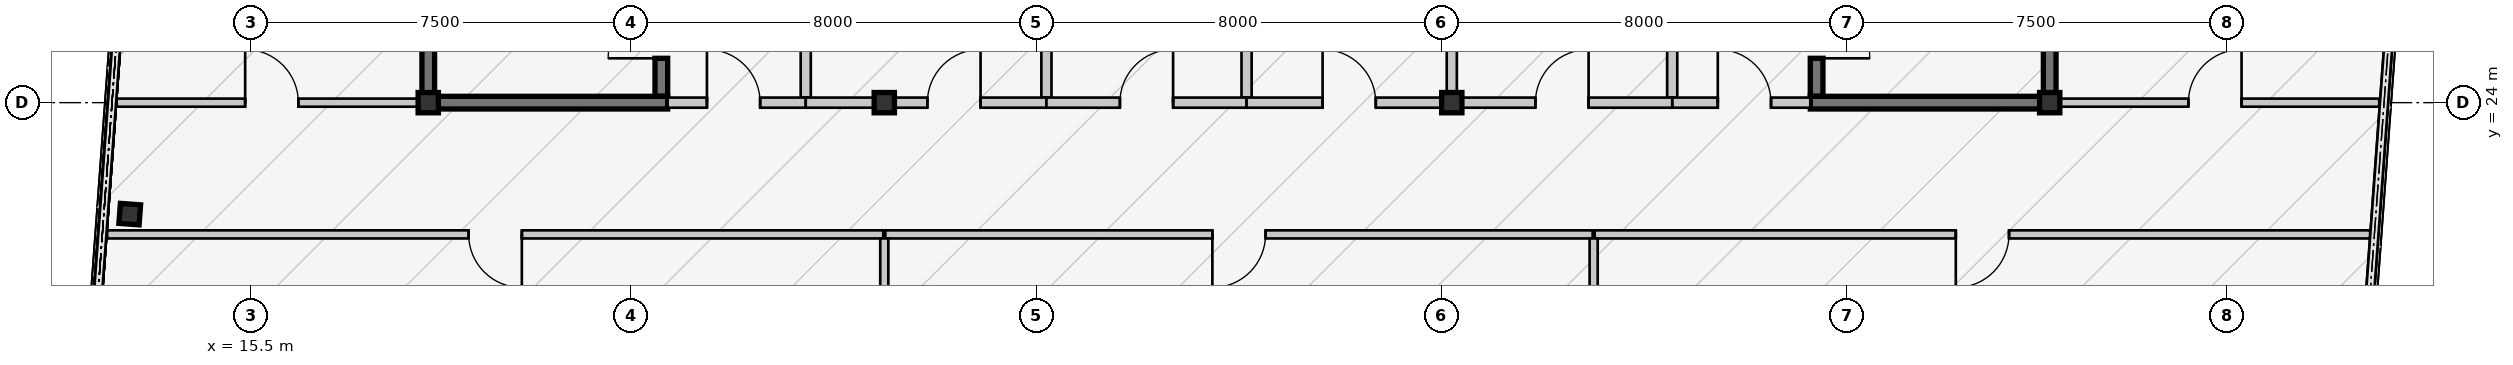
"""IFC4 building model, lengths in metres.
Left out: names, types, materials, properties, quantities, classifications, styles, units other than length and angle.
Written with IfcOpenShell. Run it as: python <this file> out.ifc"""

import sys

from ifc_helpers import new_model, si_unit, direction, frame, frame_2d, origin, origin_2d, place, context, subcontext, project, spatial, rectangle, hollow_rectangle, i_section, extrude, source, transform, mapped, element, fill, save


model = new_model("IFC4")
c1 = context("Model", 3, precision=1e-05, world=origin(), true_north=direction((0.0, 1.0)))
c2 = subcontext(c1, "Body", "Model", "MODEL_VIEW")
j1 = project(units=[si_unit("LENGTHUNIT", "METRE"), si_unit("PLANEANGLEUNIT", "RADIAN")], contexts=[c1])
p1 = place(None, origin())
s1 = spatial("IfcSite", under=j1, at=p1, CompositionType="ELEMENT")
p2 = place(p1, origin())
s2 = spatial("IfcBuilding", under=s1, at=p2, CompositionType="ELEMENT")
p3 = place(p2, frame((0.0, 0.0, 253.05)))
s3 = spatial("IfcBuildingStorey", under=s2, at=p3, CompositionType="ELEMENT", Elevation=253.05)
m1 = source(origin(), c2, "Body", "SweptSolid", [
    extrude(hollow_rectangle(XDim=0.4, YDim=0.4, WallThickness=0.016, at=origin_2d()), origin(), (0.0, 0.0, 1.0), 15.375),
])
p4 = place(p3, frame((19.0, 24.0, 0.0), z_axis=(0.0, 0.0, 1.0), x_axis=(1.0, 0.0, 0.0)))
e1 = element("IfcColumn", 1, at=p4, inside=s3, PredefinedType="COLUMN", context=c2, shape_type="MappedRepresentation", body=[
    mapped(m1, transform((0.0, 0.0, 0.0), scale=1.0)),
])
m2 = source(origin(), c2, "Body", "SweptSolid", [
    extrude(hollow_rectangle(XDim=0.4, YDim=0.4, WallThickness=0.016, at=origin_2d()), origin(), (0.0, 0.0, 1.0), 12.802),
])
p5 = place(p3, frame((28.0, 24.0, 0.0), z_axis=(0.0, 0.0, 1.0), x_axis=(1.0, 0.0, 0.0)))
e2 = element("IfcColumn", 2, at=p5, inside=s3, PredefinedType="COLUMN", context=c2, shape_type="MappedRepresentation", body=[
    mapped(m2, transform((0.0, 0.0, 0.0), scale=1.0)),
])
m3 = source(origin(), c2, "Body", "SweptSolid", [
    extrude(hollow_rectangle(XDim=0.4, YDim=0.4, WallThickness=0.016, at=origin_2d()), origin(), (0.0, 0.0, 1.0), 9.6),
])
p6 = place(p3, frame((39.2, 24.0, 0.0), z_axis=(0.0, 0.0, 1.0), x_axis=(1.0, 0.0, 0.0)))
e3 = element("IfcColumn", 3, at=p6, inside=s3, PredefinedType="COLUMN", context=c2, shape_type="MappedRepresentation", body=[
    mapped(m3, transform((0.0, 0.0, 0.0), scale=1.0)),
])
m4 = source(origin(), c2, "Body", "SweptSolid", [
    extrude(hollow_rectangle(XDim=0.4, YDim=0.4, WallThickness=0.016, at=origin_2d()), origin(), (0.0, 0.0, 1.0), 6.227),
])
p7 = place(p3, frame((51.0, 24.0, 0.0), z_axis=(0.0, 0.0, 1.0), x_axis=(1.0, 0.0, 0.0)))
e4 = element("IfcColumn", 4, at=p7, inside=s3, PredefinedType="COLUMN", context=c2, shape_type="MappedRepresentation", body=[
    mapped(m4, transform((0.0, 0.0, 0.0), scale=1.0)),
])
m5 = source(origin(), c2, "Body", "SweptSolid", [
    extrude(i_section(OverallWidth=0.4, OverallDepth=0.396, WebThickness=0.022, FlangeThickness=0.034, at=origin_2d()), origin(), (0.0, 0.0, 1.0), 17.014),
])
p8 = place(p3, frame((13.109, 21.8, 0.0), z_axis=(0.0, 0.0, 1.0), x_axis=(0.997314477224, -0.073238197128, 0.0)))
e5 = element("IfcColumn", 5, at=p8, inside=s3, PredefinedType="COLUMN", context=c2, shape_type="MappedRepresentation", body=[
    mapped(m5, transform((0.0, 0.0, 0.0), scale=1.0)),
])
m6 = source(origin(), c2, "Body", "SweptSolid", [
    extrude(rectangle(XDim=4.075, YDim=0.25, at=frame_2d((2.038, 0.0))), origin(), (0.0, 0.0, 1.0), 4.3),
])
for number, where, z_axis, x_axis in (
    (6, (19.0, 24.125, 0.0), (0.0, 0.0, 1.0), (0.0, 1.0, 0.0)),
    (7, (51.0, 24.125, 0.0), (0.0, 0.0, 1.0), (0.0, 1.0, 0.0)),
):
    element("IfcWall", number, at=place(p3, frame(where, z_axis=z_axis, x_axis=x_axis)), inside=s3, PredefinedType="SHEAR", context=c2, shape_type="MappedRepresentation", body=[
        mapped(m6, transform((0.0, 0.0, 0.0), scale=1.0)),
    ])
m7 = source(origin(), c2, "Body", "SweptSolid", [
    extrude(rectangle(XDim=3.95, YDim=0.25, at=frame_2d((1.975, 0.0))), origin(), (0.0, 0.0, 1.0), 4.3),
])
p9 = place(p3, frame((23.6, 24.125, 0.0), z_axis=(0.0, 0.0, 1.0), x_axis=(0.0, 1.0, 0.0)))
e8 = element("IfcWall", 8, at=p9, inside=s3, PredefinedType="SHEAR", context=c2, shape_type="MappedRepresentation", body=[
    mapped(m7, transform((0.0, 0.0, 0.0), scale=1.0)),
])
m8 = source(origin(), c2, "Body", "SweptSolid", [
    extrude(rectangle(XDim=1.05, YDim=2.1, at=frame_2d((0.525, 1.05))), frame((0.0, 0.135, 0.0), z_axis=(0.0, -1.0, 0.0), x_axis=(1.0, 0.0, 0.0)), (0.0, 0.0, 1.0), 0.27),
])
p10 = place(p9, frame((0.75, 0.0, 0.0)))
e9 = element("IfcOpeningElement", 9, at=p10, cuts=e8, PredefinedType="OPENING", context=c2, shape_type="MappedRepresentation", body=[
    mapped(m8, transform((0.0, 0.0, 0.0), scale=1.0)),
])
m9 = source(origin(), c2, "Body", "SweptSolid", [
    extrude(rectangle(XDim=4.85, YDim=0.25, at=frame_2d((2.425, 0.0))), origin(), (0.0, 0.0, 1.0), 4.3),
])
p11 = place(p3, frame((18.875, 24.0, 0.0), z_axis=(0.0, 0.0, 1.0), x_axis=(1.0, 0.0, 0.0)))
e10 = element("IfcWall", 10, at=p11, inside=s3, PredefinedType="SHEAR", context=c2, shape_type="MappedRepresentation", body=[
    mapped(m9, transform((0.0, 0.0, 0.0), scale=1.0)),
])
m10 = source(origin(), c2, "Body", "SweptSolid", [
    extrude(rectangle(XDim=4.0, YDim=0.2, at=frame_2d((2.0, 0.0))), origin(), (0.0, 0.0, 1.0), 4.3),
])
p12 = place(p3, frame((26.45, 24.1, 0.0), z_axis=(0.0, 0.0, 1.0), x_axis=(0.0, 1.0, 0.0)))
e11 = element("IfcWall", 11, at=p12, inside=s3, PredefinedType="SOLIDWALL", context=c2, shape_type="MappedRepresentation", body=[
    mapped(m10, transform((0.0, 0.0, 0.0), scale=1.0)),
])
m11 = source(origin(), c2, "Body", "SweptSolid", [
    extrude(rectangle(XDim=2.725, YDim=0.2, at=frame_2d((1.362, 0.0))), origin(), (0.0, 0.0, 1.0), 4.3),
])
p13 = place(p3, frame((23.725, 24.0, 0.0), z_axis=(0.0, 0.0, 1.0), x_axis=(1.0, 0.0, 0.0)))
e12 = element("IfcWall", 12, at=p13, inside=s3, PredefinedType="SOLIDWALL", context=c2, shape_type="MappedRepresentation", body=[
    mapped(m11, transform((0.0, 0.0, 0.0), scale=1.0)),
])
m12 = source(origin(), c2, "Body", "SweptSolid", [
    extrude(rectangle(XDim=1.05, YDim=2.1, at=frame_2d((0.525, 1.05))), frame((0.0, 0.11, 0.0), z_axis=(0.0, -1.0, 0.0), x_axis=(1.0, 0.0, 0.0)), (0.0, 0.0, 1.0), 0.22),
])
p14 = place(p13, frame((0.775, 0.0, 0.0)))
e13 = element("IfcOpeningElement", 13, at=p14, cuts=e12, PredefinedType="OPENING", context=c2, shape_type="MappedRepresentation", body=[
    mapped(m12, transform((0.0, 0.0, 0.0), scale=1.0)),
])
p15 = place(p3, frame((46.4, 28.075, 0.0), z_axis=(0.0, 0.0, 1.0), x_axis=(0.0, -1.0, 0.0)))
e14 = element("IfcWall", 14, at=p15, inside=s3, PredefinedType="SHEAR", context=c2, shape_type="MappedRepresentation", body=[
    mapped(m7, transform((0.0, 0.0, 0.0), scale=1.0)),
])
p16 = place(p15, frame((2.15, 0.0, 0.0)))
e15 = element("IfcOpeningElement", 15, at=p16, cuts=e14, PredefinedType="OPENING", context=c2, shape_type="MappedRepresentation", body=[
    mapped(m8, transform((0.0, 0.0, 0.0), scale=1.0)),
])
p17 = place(p3, frame((46.275, 24.0, 0.0), z_axis=(0.0, 0.0, 1.0), x_axis=(1.0, 0.0, 0.0)))
e16 = element("IfcWall", 16, at=p17, inside=s3, PredefinedType="SHEAR", context=c2, shape_type="MappedRepresentation", body=[
    mapped(m9, transform((0.0, 0.0, 0.0), scale=1.0)),
])
p18 = place(p3, frame((43.55, 28.1, 0.0), z_axis=(0.0, 0.0, 1.0), x_axis=(0.0, -1.0, 0.0)))
e17 = element("IfcWall", 17, at=p18, inside=s3, PredefinedType="SOLIDWALL", context=c2, shape_type="MappedRepresentation", body=[
    mapped(m10, transform((0.0, 0.0, 0.0), scale=1.0)),
])
p19 = place(p3, frame((43.55, 24.0, 0.0), z_axis=(0.0, 0.0, 1.0), x_axis=(1.0, 0.0, 0.0)))
e18 = element("IfcWall", 18, at=p19, inside=s3, PredefinedType="SOLIDWALL", context=c2, shape_type="MappedRepresentation", body=[
    mapped(m11, transform((0.0, 0.0, 0.0), scale=1.0)),
])
p20 = place(p19, frame((0.9, 0.0, 0.0)))
e19 = element("IfcOpeningElement", 19, at=p20, cuts=e18, PredefinedType="OPENING", context=c2, shape_type="MappedRepresentation", body=[
    mapped(m12, transform((0.0, 0.0, 0.0), scale=1.0)),
])
m13 = source(origin(), c2, "Body", "SweptSolid", [
    extrude(rectangle(XDim=7.775, YDim=0.2, at=frame_2d((3.887, 0.0))), origin(), (0.0, 0.0, 1.0), 4.3),
])
p21 = place(p3, frame((31.2, 31.875, 0.0), z_axis=(0.0, 0.0, 1.0), x_axis=(0.0, -1.0, 0.0)))
e20 = element("IfcWall", 20, at=p21, inside=s3, PredefinedType="SOLIDWALL", context=c2, shape_type="MappedRepresentation", body=[
    mapped(m13, transform((0.0, 0.0, 0.0), scale=1.0)),
])
m14 = source(origin(), c2, "Body", "SweptSolid", [
    extrude(rectangle(XDim=4.75, YDim=0.2, at=frame_2d((2.375, 0.0))), origin(), (0.0, 0.0, 1.0), 4.3),
])
p22 = place(p3, frame((31.2, 24.0, 0.0), z_axis=(0.0, 0.0, 1.0), x_axis=(-1.0, 0.0, 0.0)))
e21 = element("IfcWall", 21, at=p22, inside=s3, PredefinedType="SOLIDWALL", context=c2, shape_type="MappedRepresentation", body=[
    mapped(m14, transform((0.0, 0.0, 0.0), scale=1.0)),
])
p23 = place(p22, frame((1.3, 0.0, 0.0)))
e22 = element("IfcOpeningElement", 22, at=p23, cuts=e21, PredefinedType="OPENING", context=c2, shape_type="MappedRepresentation", body=[
    mapped(m12, transform((0.0, 0.0, 0.0), scale=1.0)),
])
m15 = source(origin(), c2, "Body", "SweptSolid", [
    extrude(rectangle(XDim=4.775, YDim=0.2, at=frame_2d((2.387, 0.0))), origin(), (0.0, 0.0, 1.0), 4.3),
])
p24 = place(p3, frame((35.15, 28.875, 0.0), z_axis=(0.0, 0.0, 1.0), x_axis=(0.0, -1.0, 0.0)))
e23 = element("IfcWall", 23, at=p24, inside=s3, PredefinedType="SOLIDWALL", context=c2, shape_type="MappedRepresentation", body=[
    mapped(m15, transform((0.0, 0.0, 0.0), scale=1.0)),
])
m16 = source(origin(), c2, "Body", "SweptSolid", [
    extrude(rectangle(XDim=3.95, YDim=0.2, at=frame_2d((1.975, 0.0))), origin(), (0.0, 0.0, 1.0), 4.3),
])
p25 = place(p3, frame((35.15, 24.0, 0.0), z_axis=(0.0, 0.0, 1.0), x_axis=(-1.0, 0.0, 0.0)))
e24 = element("IfcWall", 24, at=p25, inside=s3, PredefinedType="SOLIDWALL", context=c2, shape_type="MappedRepresentation", body=[
    mapped(m16, transform((0.0, 0.0, 0.0), scale=1.0)),
])
p26 = place(p25, frame((1.45, 0.0, 0.0)))
e25 = element("IfcOpeningElement", 25, at=p26, cuts=e24, PredefinedType="OPENING", context=c2, shape_type="MappedRepresentation", body=[
    mapped(m12, transform((0.0, 0.0, 0.0), scale=1.0)),
])
p27 = place(p3, frame((39.2, 31.875, 0.0), z_axis=(0.0, 0.0, 1.0), x_axis=(0.0, -1.0, 0.0)))
e26 = element("IfcWall", 26, at=p27, inside=s3, PredefinedType="SOLIDWALL", context=c2, shape_type="MappedRepresentation", body=[
    mapped(m13, transform((0.0, 0.0, 0.0), scale=1.0)),
])
m17 = source(origin(), c2, "Body", "SweptSolid", [
    extrude(rectangle(XDim=4.05, YDim=0.2, at=frame_2d((2.025, 0.0))), origin(), (0.0, 0.0, 1.0), 4.3),
])
p28 = place(p3, frame((39.2, 24.0, 0.0), z_axis=(0.0, 0.0, 1.0), x_axis=(-1.0, 0.0, 0.0)))
e27 = element("IfcWall", 27, at=p28, inside=s3, PredefinedType="SOLIDWALL", context=c2, shape_type="MappedRepresentation", body=[
    mapped(m17, transform((0.0, 0.0, 0.0), scale=1.0)),
])
p29 = place(p28, frame((1.5, 0.0, 0.0)))
e28 = element("IfcOpeningElement", 28, at=p29, cuts=e27, PredefinedType="OPENING", context=c2, shape_type="MappedRepresentation", body=[
    mapped(m12, transform((0.0, 0.0, 0.0), scale=1.0)),
])
m18 = source(origin(), c2, "Body", "SweptSolid", [
    extrude(rectangle(XDim=4.35, YDim=0.2, at=frame_2d((2.175, 0.0))), origin(), (0.0, 0.0, 1.0), 4.3),
])
p30 = place(p3, frame((43.55, 24.0, 0.0), z_axis=(0.0, 0.0, 1.0), x_axis=(-1.0, 0.0, 0.0)))
e29 = element("IfcWall", 29, at=p30, inside=s3, PredefinedType="SOLIDWALL", context=c2, shape_type="MappedRepresentation", body=[
    mapped(m18, transform((0.0, 0.0, 0.0), scale=1.0)),
])
p31 = place(p30, frame((1.65, 0.0, 0.0)))
e30 = element("IfcOpeningElement", 30, at=p31, cuts=e29, PredefinedType="OPENING", context=c2, shape_type="MappedRepresentation", body=[
    mapped(m12, transform((0.0, 0.0, 0.0), scale=1.0)),
])
m19 = source(origin(), c2, "Body", "SweptSolid", [
    extrude(rectangle(XDim=13.959, YDim=0.16, at=frame_2d((6.98, 0.0))), origin(), (0.0, 0.0, 1.0), 4.3),
])
p32 = place(p3, frame((41.98, 21.4, 0.0), z_axis=(0.0, 0.0, 1.0), x_axis=(-1.0, 0.0, 0.0)))
e31 = element("IfcWall", 31, at=p32, inside=s3, PredefinedType="PARTITIONING", context=c2, shape_type="MappedRepresentation", body=[
    mapped(m19, transform((0.0, 0.0, 0.0), scale=1.0)),
])
m20 = source(origin(), c2, "Body", "SweptSolid", [
    extrude(rectangle(XDim=1.05, YDim=2.1, at=frame_2d((0.525, 1.05))), frame((0.0, 0.09, 0.0), z_axis=(0.0, -1.0, 0.0), x_axis=(1.0, 0.0, 0.0)), (0.0, 0.0, 1.0), 0.18),
])
p33 = place(p32, frame((6.455, 0.0, 0.0)))
e32 = element("IfcOpeningElement", 32, at=p33, cuts=e31, PredefinedType="OPENING", context=c2, shape_type="MappedRepresentation", body=[
    mapped(m20, transform((0.0, 0.0, 0.0), scale=1.0)),
])
m21 = source(origin(), c2, "Body", "SweptSolid", [
    extrude(rectangle(XDim=15.316, YDim=0.16, at=frame_2d((7.658, 0.0))), origin(), (0.0, 0.0, 1.0), 4.3),
])
p34 = place(p3, frame((27.98, 21.4, 0.0), z_axis=(0.0, 0.0, 1.0), x_axis=(-1.0, 0.0, 0.0)))
e33 = element("IfcWall", 33, at=p34, inside=s3, PredefinedType="PARTITIONING", context=c2, shape_type="MappedRepresentation", body=[
    mapped(m21, transform((0.0, 0.0, 0.0), scale=1.0)),
])
p35 = place(p34, frame((7.133, 0.0, 0.0)))
e34 = element("IfcOpeningElement", 34, at=p35, cuts=e33, PredefinedType="OPENING", context=c2, shape_type="MappedRepresentation", body=[
    mapped(m20, transform((0.0, 0.0, 0.0), scale=1.0)),
])
m22 = source(origin(), c2, "Body", "SweptSolid", [
    extrude(rectangle(XDim=15.304, YDim=0.16, at=frame_2d((7.652, 0.0))), origin(), (0.0, 0.0, 1.0), 4.3),
])
p36 = place(p3, frame((57.324, 21.4, 0.0), z_axis=(0.0, 0.0, 1.0), x_axis=(-1.0, 0.0, 0.0)))
e35 = element("IfcWall", 35, at=p36, inside=s3, PredefinedType="PARTITIONING", context=c2, shape_type="MappedRepresentation", body=[
    mapped(m22, transform((0.0, 0.0, 0.0), scale=1.0)),
])
p37 = place(p36, frame((7.127, 0.0, 0.0)))
e36 = element("IfcOpeningElement", 36, at=p37, cuts=e35, PredefinedType="OPENING", context=c2, shape_type="MappedRepresentation", body=[
    mapped(m20, transform((0.0, 0.0, 0.0), scale=1.0)),
])
m23 = source(origin(), c2, "Body", "SweptSolid", [
    extrude(rectangle(XDim=6.032, YDim=0.16, at=frame_2d((3.016, 0.0))), origin(), (0.0, 0.0, 1.0), 4.3),
])
p38 = place(p3, frame((12.843, 24.0, 0.0), z_axis=(0.0, 0.0, 1.0), x_axis=(1.0, 0.0, 0.0)))
e37 = element("IfcWall", 37, at=p38, inside=s3, PredefinedType="PARTITIONING", context=c2, shape_type="MappedRepresentation", body=[
    mapped(m23, transform((0.0, 0.0, 0.0), scale=1.0)),
])
p39 = place(p38, frame((2.543, 0.0, 0.0)))
e38 = element("IfcOpeningElement", 38, at=p39, cuts=e37, PredefinedType="OPENING", context=c2, shape_type="MappedRepresentation", body=[
    mapped(m20, transform((0.0, 0.0, 0.0), scale=1.0)),
])
m24 = source(origin(), c2, "Body", "SweptSolid", [
    extrude(rectangle(XDim=6.378, YDim=0.16, at=frame_2d((3.189, 0.0))), origin(), (0.0, 0.0, 1.0), 4.3),
])
p40 = place(p3, frame((51.125, 24.0, 0.0), z_axis=(0.0, 0.0, 1.0), x_axis=(1.0, 0.0, 0.0)))
e39 = element("IfcWall", 39, at=p40, inside=s3, PredefinedType="PARTITIONING", context=c2, shape_type="MappedRepresentation", body=[
    mapped(m24, transform((0.0, 0.0, 0.0), scale=1.0)),
])
p41 = place(p40, frame((2.612, 0.0, 0.0)))
e40 = element("IfcOpeningElement", 40, at=p41, cuts=e39, PredefinedType="OPENING", context=c2, shape_type="MappedRepresentation", body=[
    mapped(m20, transform((0.0, 0.0, 0.0), scale=1.0)),
])
m25 = source(origin(), c2, "Body", "SweptSolid", [
    extrude(rectangle(XDim=16.231, YDim=0.16, at=frame_2d((8.116, 0.0))), origin(), (0.0, 0.0, 1.0), 4.3),
])
p42 = place(p3, frame((28.0, 5.089, 0.0), z_axis=(0.0, 0.0, 1.0), x_axis=(0.0, 1.0, 0.0)))
e41 = element("IfcWall", 41, at=p42, inside=s3, PredefinedType="PARTITIONING", context=c2, shape_type="MappedRepresentation", body=[
    mapped(m25, transform((0.0, 0.0, 0.0), scale=1.0)),
])
m26 = source(origin(), c2, "Body", "SweptSolid", [
    extrude(rectangle(XDim=17.248, YDim=0.16, at=frame_2d((8.624, 0.0))), origin(), (0.0, 0.0, 1.0), 4.3),
])
p43 = place(p3, frame((42.0, 21.32, 0.0), z_axis=(0.0, 0.0, 1.0), x_axis=(0.0, -1.0, 0.0)))
e42 = element("IfcWall", 42, at=p43, inside=s3, PredefinedType="PARTITIONING", context=c2, shape_type="MappedRepresentation", body=[
    mapped(m26, transform((0.0, 0.0, 0.0), scale=1.0)),
])
m27 = source(origin(), c2, "Body", "SweptSolid", [
    extrude(rectangle(XDim=1.05, YDim=2.1, at=frame_2d((0.525, 1.05))), frame((0.0, 0.025, 0.0), z_axis=(0.0, -1.0, 0.0), x_axis=(1.0, 0.0, 0.0)), (0.0, 0.0, 1.0), 0.05),
])
p44 = place(p10, origin())
e43 = element("IfcDoor", 43, at=p44, inside=s3, OperationType="SINGLE_SWING_LEFT", PredefinedType="DOOR", context=c2, shape_type="MappedRepresentation", body=[
    mapped(m27, transform((0.0, 0.0, 0.0), scale=1.0)),
])
fill(e9, e43)
p45 = place(p14, origin())
e44 = element("IfcDoor", 44, at=p45, inside=s3, OperationType="SINGLE_SWING_LEFT", PredefinedType="DOOR", context=c2, shape_type="MappedRepresentation", body=[
    mapped(m27, transform((0.0, 0.0, 0.0), scale=1.0)),
])
fill(e13, e44)
p46 = place(p16, origin())
e45 = element("IfcDoor", 45, at=p46, inside=s3, OperationType="SINGLE_SWING_RIGHT", PredefinedType="DOOR", context=c2, shape_type="MappedRepresentation", body=[
    mapped(m27, transform((0.0, 0.0, 0.0), scale=1.0)),
])
fill(e15, e45)
p47 = place(p20, origin())
e46 = element("IfcDoor", 46, at=p47, inside=s3, OperationType="SINGLE_SWING_LEFT", PredefinedType="DOOR", context=c2, shape_type="MappedRepresentation", body=[
    mapped(m27, transform((0.0, 0.0, 0.0), scale=1.0)),
])
fill(e19, e46)
p48 = place(p23, frame((1.05, 0.0, 0.0), z_axis=(0.0, 0.0, 1.0), x_axis=(-1.0, 0.0, 0.0)))
e47 = element("IfcDoor", 47, at=p48, inside=s3, OperationType="SINGLE_SWING_RIGHT", PredefinedType="DOOR", context=c2, shape_type="MappedRepresentation", body=[
    mapped(m27, transform((0.0, 0.0, 0.0), scale=1.0)),
])
fill(e22, e47)
p49 = place(p26, frame((1.05, 0.0, 0.0), z_axis=(0.0, 0.0, 1.0), x_axis=(-1.0, 0.0, 0.0)))
e48 = element("IfcDoor", 48, at=p49, inside=s3, OperationType="SINGLE_SWING_RIGHT", PredefinedType="DOOR", context=c2, shape_type="MappedRepresentation", body=[
    mapped(m27, transform((0.0, 0.0, 0.0), scale=1.0)),
])
fill(e25, e48)
p50 = place(p29, frame((1.05, 0.0, 0.0), z_axis=(0.0, 0.0, 1.0), x_axis=(-1.0, 0.0, 0.0)))
e49 = element("IfcDoor", 49, at=p50, inside=s3, OperationType="SINGLE_SWING_LEFT", PredefinedType="DOOR", context=c2, shape_type="MappedRepresentation", body=[
    mapped(m27, transform((0.0, 0.0, 0.0), scale=1.0)),
])
fill(e28, e49)
p51 = place(p31, frame((1.05, 0.0, 0.0), z_axis=(0.0, 0.0, 1.0), x_axis=(-1.0, 0.0, 0.0)))
e50 = element("IfcDoor", 50, at=p51, inside=s3, OperationType="SINGLE_SWING_RIGHT", PredefinedType="DOOR", context=c2, shape_type="MappedRepresentation", body=[
    mapped(m27, transform((0.0, 0.0, 0.0), scale=1.0)),
])
fill(e30, e50)
p52 = place(p33, origin())
e51 = element("IfcDoor", 51, at=p52, inside=s3, OperationType="SINGLE_SWING_RIGHT", PredefinedType="DOOR", context=c2, shape_type="MappedRepresentation", body=[
    mapped(m27, transform((0.0, 0.0, 0.0), scale=1.0)),
])
fill(e32, e51)
p53 = place(p35, origin())
e52 = element("IfcDoor", 52, at=p53, inside=s3, OperationType="SINGLE_SWING_LEFT", PredefinedType="DOOR", context=c2, shape_type="MappedRepresentation", body=[
    mapped(m27, transform((0.0, 0.0, 0.0), scale=1.0)),
])
fill(e34, e52)
p54 = place(p37, origin())
e53 = element("IfcDoor", 53, at=p54, inside=s3, OperationType="SINGLE_SWING_RIGHT", PredefinedType="DOOR", context=c2, shape_type="MappedRepresentation", body=[
    mapped(m27, transform((0.0, 0.0, 0.0), scale=1.0)),
])
fill(e36, e53)
p55 = place(p39, origin())
e54 = element("IfcDoor", 54, at=p55, inside=s3, OperationType="SINGLE_SWING_LEFT", PredefinedType="DOOR", context=c2, shape_type="MappedRepresentation", body=[
    mapped(m27, transform((0.0, 0.0, 0.0), scale=1.0)),
])
fill(e38, e54)
p56 = place(p41, origin())
e55 = element("IfcDoor", 55, at=p56, inside=s3, OperationType="SINGLE_SWING_RIGHT", PredefinedType="DOOR", context=c2, shape_type="MappedRepresentation", body=[
    mapped(m27, transform((0.0, 0.0, 0.0), scale=1.0)),
])
fill(e40, e55)
save(model, sys.argv[1])
